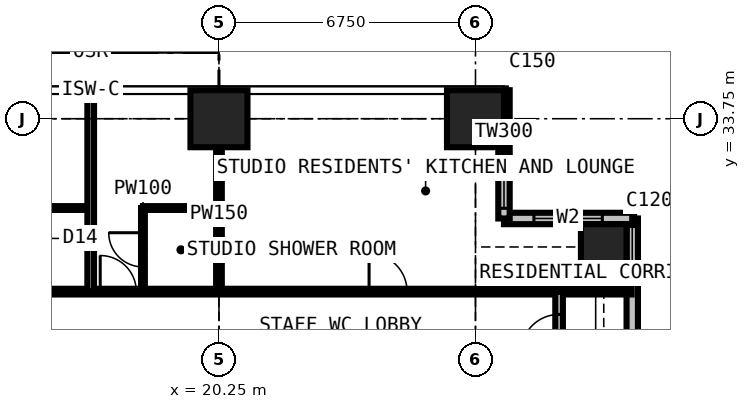
"""IFC4 building model, lengths in metres.
Left out: names, types, materials, properties, quantities, classifications, styles, units other than length and angle.
Written with IfcOpenShell. Run it as: python <this file> out.ifc"""

import sys

from ifc_helpers import new_model, si_unit, direction, frame, frame_2d, origin, origin_2d, place, context, subcontext, project, spatial, rectangle, extrude, element, fill, save


model = new_model("IFC4")
c1 = context("Model", 3, precision=1e-05, world=origin(), true_north=direction((0.0, 1.0)))
c2 = subcontext(c1, "Body", "Model", "MODEL_VIEW")
j1 = project(units=[si_unit("LENGTHUNIT", "METRE"), si_unit("PLANEANGLEUNIT", "RADIAN")], contexts=[c1])
p1 = place(None, origin())
s1 = spatial("IfcSite", under=j1, at=p1, CompositionType="ELEMENT")
p2 = place(p1, origin())
s2 = spatial("IfcBuilding", under=s1, at=p2, CompositionType="ELEMENT")
p3 = place(p2, frame((0.0, 0.0, 167.4)))
s3 = spatial("IfcBuildingStorey", under=s2, at=p3, CompositionType="ELEMENT", Elevation=167.4)
for number, where, z_axis, x_axis in (
    (1, (20.25, 33.75, 0.0), (0.0, 0.0, 1.0), (1.0, 0.0, 0.0)),
    (2, (27.0, 33.75, 0.0), (0.0, 0.0, 1.0), (1.0, 0.0, 0.0)),
):
    element("IfcColumn", number, at=place(p3, frame(where, z_axis=z_axis, x_axis=x_axis)), inside=s3, PredefinedType="COLUMN", context=c2, shape_type="SweptSolid", body=[
        extrude(rectangle(XDim=1.5, YDim=1.5, at=origin_2d()), origin(), (0.0, 0.0, 1.0), 3.6),
    ])
p4 = place(p3, frame((30.375, 30.375, 0.0), z_axis=(0.0, 0.0, 1.0), x_axis=(1.0, 0.0, 0.0)))
e3 = element("IfcColumn", 3, at=p4, inside=s3, PredefinedType="COLUMN", context=c2, shape_type="SweptSolid", body=[
    extrude(rectangle(XDim=1.2, YDim=1.2, at=origin_2d()), origin(), (0.0, 0.0, 1.0), 3.6),
])
p5 = place(p3, frame((31.125, 27.75, 0.0), z_axis=(0.0, 0.0, 1.0), x_axis=(0.0, 1.0, 0.0)))
e4 = element("IfcWall", 4, at=p5, inside=s3, PredefinedType="SOLIDWALL", context=c2, shape_type="SweptSolid", body=[
    extrude(rectangle(XDim=3.375, YDim=0.3, at=frame_2d((1.688, 0.0))), origin(), (0.0, 0.0, 1.0), 3.375),
])
p6 = place(p5, frame((1.663, 0.0, 0.9)))
e5 = element("IfcOpeningElement", 5, at=p6, cuts=e4, PredefinedType="OPENING", context=c2, shape_type="SweptSolid", body=[
    extrude(rectangle(XDim=1.5, YDim=1.8, at=frame_2d((0.75, 0.9))), frame((0.0, 0.16, 0.0), z_axis=(0.0, -1.0, 0.0), x_axis=(1.0, 0.0, 0.0)), (0.0, 0.0, 1.0), 0.32),
])
p7 = place(p3, frame((31.125, 31.125, 0.0), z_axis=(0.0, 0.0, 1.0), x_axis=(-1.0, 0.0, 0.0)))
e6 = element("IfcWall", 6, at=p7, inside=s3, PredefinedType="SOLIDWALL", context=c2, shape_type="SweptSolid", body=[
    extrude(rectangle(XDim=3.375, YDim=0.3, at=frame_2d((1.688, 0.0))), origin(), (0.0, 0.0, 1.0), 3.375),
])
p8 = place(p7, frame((0.788, 0.0, 0.6)))
e7 = element("IfcOpeningElement", 7, at=p8, cuts=e6, PredefinedType="OPENING", context=c2, shape_type="SweptSolid", body=[
    extrude(rectangle(XDim=1.8, YDim=2.1, at=frame_2d((0.9, 1.05))), frame((0.0, 0.16, 0.0), z_axis=(0.0, -1.0, 0.0), x_axis=(1.0, 0.0, 0.0)), (0.0, 0.0, 1.0), 0.32),
])
p9 = place(p3, frame((27.75, 31.125, 0.0), z_axis=(0.0, 0.0, 1.0), x_axis=(0.0, 1.0, 0.0)))
e8 = element("IfcWall", 8, at=p9, inside=s3, PredefinedType="SOLIDWALL", context=c2, shape_type="SweptSolid", body=[
    extrude(rectangle(XDim=3.375, YDim=0.3, at=frame_2d((1.688, 0.0))), origin(), (0.0, 0.0, 1.0), 3.375),
])
p10 = place(p9, frame((0.268, 0.0, 0.9)))
e9 = element("IfcOpeningElement", 9, at=p10, cuts=e8, PredefinedType="OPENING", context=c2, shape_type="SweptSolid", body=[
    extrude(rectangle(XDim=1.5, YDim=1.8, at=frame_2d((0.75, 0.9))), frame((0.0, 0.16, 0.0), z_axis=(0.0, -1.0, 0.0), x_axis=(1.0, 0.0, 0.0)), (0.0, 0.0, 1.0), 0.32),
])
p11 = place(p3, frame((11.3, 29.2, 0.0), z_axis=(0.0, 0.0, 1.0), x_axis=(1.0, 0.0, 0.0)))
e10 = element("IfcWall", 10, at=p11, inside=s3, PredefinedType="PARTITIONING", context=c2, shape_type="SweptSolid", body=[
    extrude(rectangle(XDim=19.809, YDim=0.15, at=frame_2d((9.904, 0.0))), origin(), (0.0, 0.0, 1.0), 3.375),
])
p12 = place(p11, frame((12.9, 0.0, 0.0)))
e11 = element("IfcOpeningElement", 11, at=p12, cuts=e10, PredefinedType="OPENING", context=c2, shape_type="SweptSolid", body=[
    extrude(rectangle(XDim=1.0, YDim=2.2, at=frame_2d((0.5, 1.1))), frame((0.0, 0.085, 0.0), z_axis=(0.0, -1.0, 0.0), x_axis=(1.0, 0.0, 0.0)), (0.0, 0.0, 1.0), 0.17),
])
p13 = place(p11, frame((5.825, 0.0, 0.0)))
e12 = element("IfcOpeningElement", 12, at=p13, cuts=e10, PredefinedType="OPENING", context=c2, shape_type="SweptSolid", body=[
    extrude(rectangle(XDim=0.95, YDim=2.2, at=frame_2d((0.475, 1.1))), frame((0.0, 0.085, 0.0), z_axis=(0.0, -1.0, 0.0), x_axis=(1.0, 0.0, 0.0)), (0.0, 0.0, 1.0), 0.17),
])
p14 = place(p11, frame((0.6, 0.0, 0.0)))
e13 = element("IfcOpeningElement", 13, at=p14, cuts=e10, PredefinedType="OPENING", context=c2, shape_type="SweptSolid", body=[
    extrude(rectangle(XDim=1.0, YDim=2.2, at=frame_2d((0.5, 1.1))), frame((0.0, 0.085, 0.0), z_axis=(0.0, -1.0, 0.0), x_axis=(1.0, 0.0, 0.0)), (0.0, 0.0, 1.0), 0.17),
])
p15 = place(p3, frame((14.875, 31.4, 0.0), z_axis=(0.0, 0.0, 1.0), x_axis=(1.0, 0.0, 0.0)))
e14 = element("IfcWall", 14, at=p15, inside=s3, PredefinedType="PARTITIONING", context=c2, shape_type="SweptSolid", body=[
    extrude(rectangle(XDim=2.0, YDim=0.1, at=frame_2d((1.0, 0.0))), origin(), (0.0, 0.0, 1.0), 3.375),
])
p16 = place(p3, frame((16.875, 29.2, 0.0), z_axis=(0.0, 0.0, 1.0), x_axis=(0.0, 1.0, 0.0)))
e15 = element("IfcWall", 15, at=p16, inside=s3, PredefinedType="PARTITIONING", context=c2, shape_type="SweptSolid", body=[
    extrude(rectangle(XDim=5.284, YDim=0.175, at=frame_2d((2.642, 0.0))), origin(), (0.0, 0.0, 1.0), 3.375),
])
p17 = place(p3, frame((18.25, 29.2, 0.0), z_axis=(0.0, 0.0, 1.0), x_axis=(0.0, 1.0, 0.0)))
e16 = element("IfcWall", 16, at=p17, inside=s3, PredefinedType="PARTITIONING", context=c2, shape_type="SweptSolid", body=[
    extrude(rectangle(XDim=2.2, YDim=0.1, at=frame_2d((1.1, 0.0))), origin(), (0.0, 0.0, 1.0), 3.375),
])
p18 = place(p17, frame((0.65, 0.0, 0.0)))
e17 = element("IfcOpeningElement", 17, at=p18, cuts=e16, PredefinedType="OPENING", context=c2, shape_type="SweptSolid", body=[
    extrude(rectangle(XDim=0.9, YDim=2.2, at=frame_2d((0.45, 1.1))), frame((0.0, 0.06, 0.0), z_axis=(0.0, -1.0, 0.0), x_axis=(1.0, 0.0, 0.0)), (0.0, 0.0, 1.0), 0.12),
])
p19 = place(p3, frame((18.25, 31.4, 0.0), z_axis=(0.0, 0.0, 1.0), x_axis=(1.0, 0.0, 0.0)))
e18 = element("IfcWall", 18, at=p19, inside=s3, PredefinedType="PARTITIONING", context=c2, shape_type="SweptSolid", body=[
    extrude(rectangle(XDim=2.0, YDim=0.1, at=frame_2d((1.0, 0.0))), origin(), (0.0, 0.0, 1.0), 3.375),
])
p20 = place(p3, frame((20.25, 29.2, 0.0), z_axis=(0.0, 0.0, 1.0), x_axis=(0.0, 1.0, 0.0)))
e19 = element("IfcWall", 19, at=p20, inside=s3, PredefinedType="PARTITIONING", context=c2, shape_type="SweptSolid", body=[
    extrude(rectangle(XDim=5.284, YDim=0.15, at=frame_2d((2.642, 0.0))), origin(), (0.0, 0.0, 1.0), 2.61),
])
p21 = place(p3, frame((29.2, 11.3, 0.0), z_axis=(0.0, 0.0, 1.0), x_axis=(0.0, 1.0, 0.0)))
e20 = element("IfcWall", 20, at=p21, inside=s3, PredefinedType="PARTITIONING", context=c2, shape_type="SweptSolid", body=[
    extrude(rectangle(XDim=17.9, YDim=0.2, at=frame_2d((8.95, 0.0))), origin(), (0.0, 0.0, 1.0), 3.375),
])
p22 = place(p21, frame((5.775, 0.0, 0.0)))
e21 = element("IfcOpeningElement", 21, at=p22, cuts=e20, PredefinedType="OPENING", context=c2, shape_type="SweptSolid", body=[
    extrude(rectangle(XDim=0.95, YDim=2.2, at=frame_2d((0.475, 1.1))), frame((0.0, 0.11, 0.0), z_axis=(0.0, -1.0, 0.0), x_axis=(1.0, 0.0, 0.0)), (0.0, 0.0, 1.0), 0.22),
])
p23 = place(p21, frame((9.2, 0.0, 0.0)))
e22 = element("IfcOpeningElement", 22, at=p23, cuts=e20, PredefinedType="OPENING", context=c2, shape_type="SweptSolid", body=[
    extrude(rectangle(XDim=0.95, YDim=2.2, at=frame_2d((0.475, 1.1))), frame((0.0, 0.11, 0.0), z_axis=(0.0, -1.0, 0.0), x_axis=(1.0, 0.0, 0.0)), (0.0, 0.0, 1.0), 0.22),
])
p24 = place(p21, frame((12.575, 0.0, 0.0)))
e23 = element("IfcOpeningElement", 23, at=p24, cuts=e20, PredefinedType="OPENING", context=c2, shape_type="SweptSolid", body=[
    extrude(rectangle(XDim=0.95, YDim=2.2, at=frame_2d((0.475, 1.1))), frame((0.0, 0.11, 0.0), z_axis=(0.0, -1.0, 0.0), x_axis=(1.0, 0.0, 0.0)), (0.0, 0.0, 1.0), 0.22),
])
p25 = place(p21, frame((16.3, 0.0, 0.0)))
e24 = element("IfcOpeningElement", 24, at=p25, cuts=e20, PredefinedType="OPENING", context=c2, shape_type="SweptSolid", body=[
    extrude(rectangle(XDim=1.0, YDim=2.2, at=frame_2d((0.5, 1.1))), frame((0.0, 0.11, 0.0), z_axis=(0.0, -1.0, 0.0), x_axis=(1.0, 0.0, 0.0)), (0.0, 0.0, 1.0), 0.22),
])
p26 = place(p6, origin())
e25 = element("IfcWindow", 25, at=p26, inside=s3, PartitioningType="SINGLE_PANEL", PredefinedType="WINDOW", context=c2, shape_type="SweptSolid", body=[
    extrude(rectangle(XDim=1.5, YDim=1.8, at=frame_2d((0.75, 0.9))), frame((0.0, 0.03, 0.0), z_axis=(0.0, -1.0, 0.0), x_axis=(1.0, 0.0, 0.0)), (0.0, 0.0, 1.0), 0.06),
])
fill(e5, e25)
p27 = place(p8, origin())
e26 = element("IfcWindow", 26, at=p27, inside=s3, PartitioningType="SINGLE_PANEL", PredefinedType="WINDOW", context=c2, shape_type="SweptSolid", body=[
    extrude(rectangle(XDim=1.8, YDim=2.1, at=frame_2d((0.9, 1.05))), frame((0.0, 0.03, 0.0), z_axis=(0.0, -1.0, 0.0), x_axis=(1.0, 0.0, 0.0)), (0.0, 0.0, 1.0), 0.06),
])
fill(e7, e26)
p28 = place(p10, origin())
e27 = element("IfcWindow", 27, at=p28, inside=s3, PartitioningType="SINGLE_PANEL", PredefinedType="WINDOW", context=c2, shape_type="SweptSolid", body=[
    extrude(rectangle(XDim=1.5, YDim=1.8, at=frame_2d((0.75, 0.9))), frame((0.0, 0.03, 0.0), z_axis=(0.0, -1.0, 0.0), x_axis=(1.0, 0.0, 0.0)), (0.0, 0.0, 1.0), 0.06),
])
fill(e9, e27)
p29 = place(p25, origin())
e28 = element("IfcDoor", 28, at=p29, inside=s3, OperationType="SINGLE_SWING_LEFT", PredefinedType="DOOR", context=c2, shape_type="SweptSolid", body=[
    extrude(rectangle(XDim=1.0, YDim=2.2, at=frame_2d((0.5, 1.1))), frame((0.0, 0.025, 0.0), z_axis=(0.0, -1.0, 0.0), x_axis=(1.0, 0.0, 0.0)), (0.0, 0.0, 1.0), 0.05),
])
fill(e24, e28)
p30 = place(p12, origin())
e29 = element("IfcDoor", 29, at=p30, inside=s3, OperationType="SINGLE_SWING_LEFT", PredefinedType="DOOR", context=c2, shape_type="SweptSolid", body=[
    extrude(rectangle(XDim=1.0, YDim=2.2, at=frame_2d((0.5, 1.1))), frame((0.0, 0.025, 0.0), z_axis=(0.0, -1.0, 0.0), x_axis=(1.0, 0.0, 0.0)), (0.0, 0.0, 1.0), 0.05),
])
fill(e11, e29)
p31 = place(p13, origin())
e30 = element("IfcDoor", 30, at=p31, inside=s3, OperationType="SINGLE_SWING_LEFT", PredefinedType="DOOR", context=c2, shape_type="SweptSolid", body=[
    extrude(rectangle(XDim=0.95, YDim=2.2, at=frame_2d((0.475, 1.1))), frame((0.0, 0.025, 0.0), z_axis=(0.0, -1.0, 0.0), x_axis=(1.0, 0.0, 0.0)), (0.0, 0.0, 1.0), 0.05),
])
fill(e12, e30)
p32 = place(p18, origin())
e31 = element("IfcDoor", 31, at=p32, inside=s3, OperationType="SINGLE_SWING_RIGHT", PredefinedType="DOOR", context=c2, shape_type="SweptSolid", body=[
    extrude(rectangle(XDim=0.9, YDim=2.2, at=frame_2d((0.45, 1.1))), frame((0.0, 0.025, 0.0), z_axis=(0.0, -1.0, 0.0), x_axis=(1.0, 0.0, 0.0)), (0.0, 0.0, 1.0), 0.05),
])
fill(e17, e31)
save(model, sys.argv[1])
